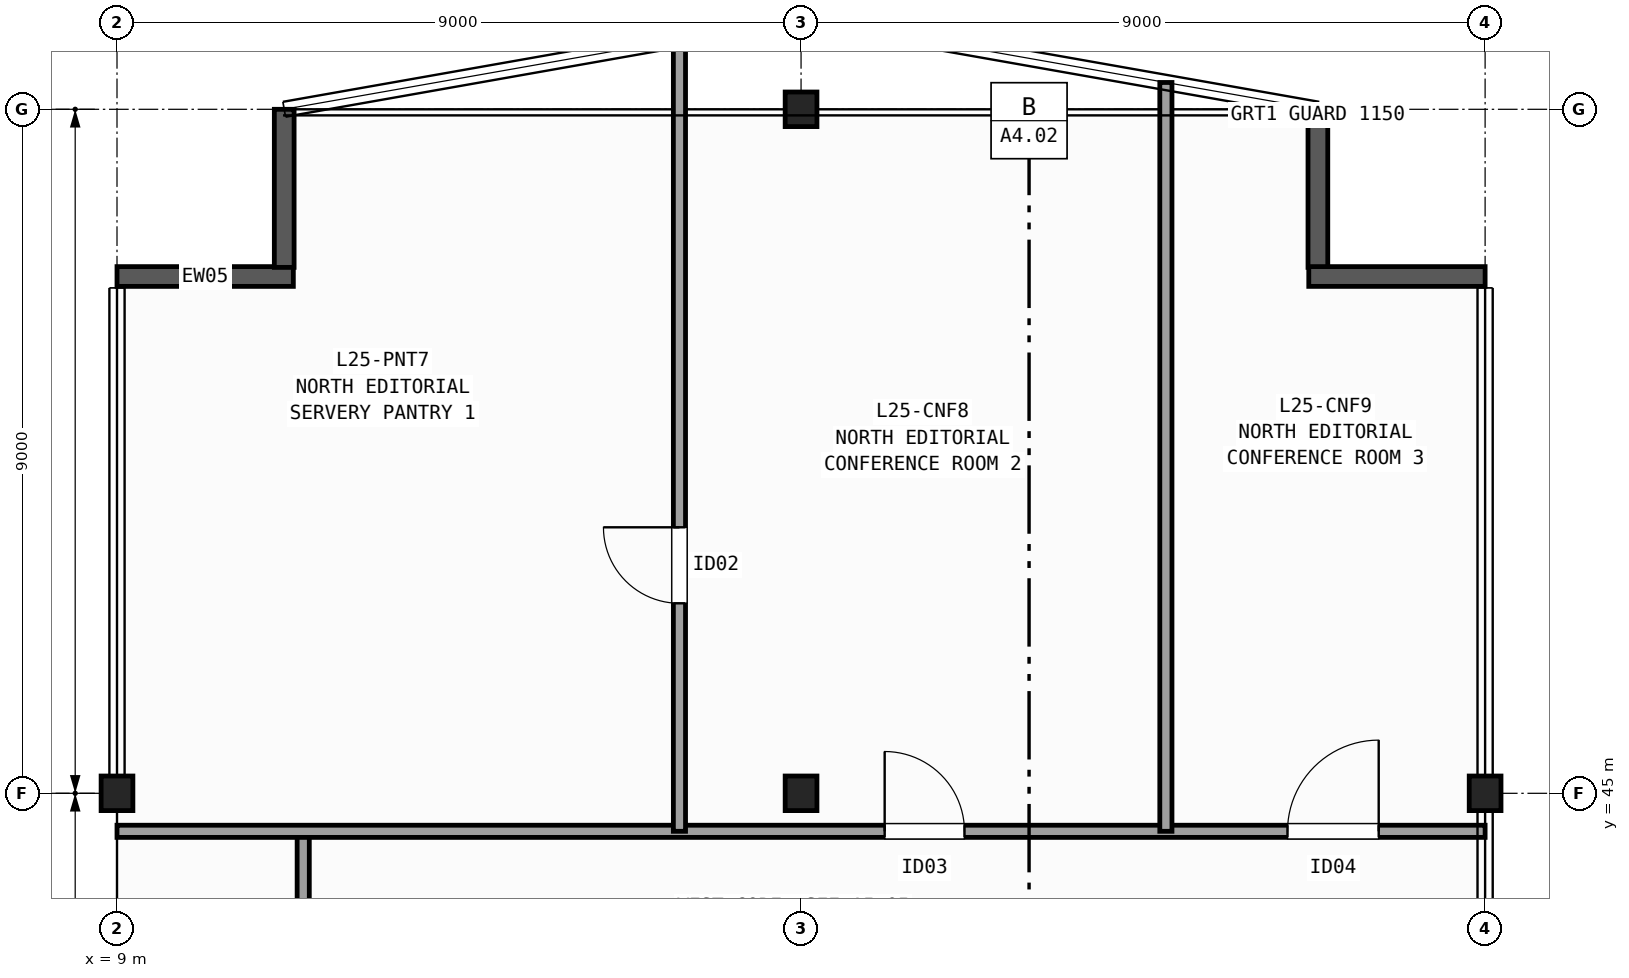
"""IFC4 building model, lengths in metres.
Left out: names, types, materials, properties, quantities, classifications, styles, units other than length and angle.
Written with IfcOpenShell. Run it as: python <this file> out.ifc"""

import sys

from ifc_helpers import new_model, si_unit, direction, frame, frame_2d, origin, origin_2d, place, context, subcontext, project, spatial, rectangle, i_section, extrude, element, fill, save


model = new_model("IFC4")
c1 = context("Model", 3, precision=1e-05, world=origin(), true_north=direction((0.0, 1.0)))
c2 = subcontext(c1, "Body", "Model", "MODEL_VIEW")
j1 = project(units=[si_unit("LENGTHUNIT", "METRE"), si_unit("PLANEANGLEUNIT", "RADIAN")], contexts=[c1])
p1 = place(None, origin())
s1 = spatial("IfcSite", under=j1, at=p1, CompositionType="ELEMENT")
p2 = place(p1, origin())
s2 = spatial("IfcBuilding", under=s1, at=p2, CompositionType="ELEMENT")
p3 = place(p2, frame((0.0, 0.0, 105.0)))
s3 = spatial("IfcBuildingStorey", under=s2, at=p3, CompositionType="ELEMENT", Elevation=105.0)
for number, where, z_axis, x_axis in (
    (1, (9.0, 45.0, 0.0), (0.0, 0.0, 1.0), (1.0, 0.0, 0.0)),
    (2, (18.0, 45.0, 0.0), (0.0, 0.0, 1.0), (1.0, 0.0, 0.0)),
    (3, (18.0, 54.0, 0.0), (0.0, 0.0, 1.0), (1.0, 0.0, 0.0)),
    (4, (27.0, 45.0, 0.0), (0.0, 0.0, 1.0), (1.0, 0.0, 0.0)),
):
    element("IfcColumn", number, at=place(p3, frame(where, z_axis=z_axis, x_axis=x_axis)), inside=s3, PredefinedType="COLUMN", context=c2, shape_type="SweptSolid", body=[
        extrude(i_section(OverallWidth=0.418, OverallDepth=0.455, WebThickness=0.042, FlangeThickness=0.068, FilletRadius=0.015, at=origin_2d()), origin(), (0.0, 0.0, 1.0), 5.0),
    ])
p4 = place(p3, frame((9.0, 51.8, 0.0), z_axis=(0.0, 0.0, 1.0), x_axis=(1.0, 0.0, 0.0)))
e5 = element("IfcWall", 5, at=p4, inside=s3, PredefinedType="SOLIDWALL", context=c2, shape_type="SweptSolid", body=[
    extrude(rectangle(XDim=2.32, YDim=0.26, at=frame_2d((1.16, 0.0))), origin(), (0.0, 0.0, 1.0), 4.72),
])
for number, where, z_axis, x_axis in (
    (6, (11.2, 51.92, 0.0), (0.0, 0.0, 1.0), (0.0, 1.0, 0.0)),
    (7, (24.8, 54.0, 0.0), (0.0, 0.0, 1.0), (0.0, -1.0, 0.0)),
):
    element("IfcWall", number, at=place(p3, frame(where, z_axis=z_axis, x_axis=x_axis)), inside=s3, PredefinedType="SOLIDWALL", context=c2, shape_type="SweptSolid", body=[
        extrude(rectangle(XDim=2.08, YDim=0.26, at=frame_2d((1.04, 0.0))), origin(), (0.0, 0.0, 1.0), 4.72),
    ])
p5 = place(p3, frame((24.68, 51.8, 0.0), z_axis=(0.0, 0.0, 1.0), x_axis=(1.0, 0.0, 0.0)))
e8 = element("IfcWall", 8, at=p5, inside=s3, PredefinedType="SOLIDWALL", context=c2, shape_type="SweptSolid", body=[
    extrude(rectangle(XDim=2.32, YDim=0.26, at=frame_2d((1.16, 0.0))), origin(), (0.0, 0.0, 1.0), 4.72),
])
p6 = place(p3, frame((11.45, 42.4, 0.0), z_axis=(0.0, 0.0, 1.0), x_axis=(0.0, 1.0, 0.0)))
e9 = element("IfcWall", 9, at=p6, inside=s3, PredefinedType="PARTITIONING", context=c2, shape_type="SweptSolid", body=[
    extrude(rectangle(XDim=2.1, YDim=0.16, at=frame_2d((1.05, 0.0))), origin(), (0.0, 0.0, 1.0), 4.72),
])
p7 = place(p3, frame((9.0, 44.5, 0.0), z_axis=(0.0, 0.0, 1.0), x_axis=(1.0, 0.0, 0.0)))
e10 = element("IfcWall", 10, at=p7, inside=s3, PredefinedType="PARTITIONING", context=c2, shape_type="SweptSolid", body=[
    extrude(rectangle(XDim=18.0, YDim=0.16, at=frame_2d((9.0, 0.0))), origin(), (0.0, 0.0, 1.0), 3.934),
])
p8 = place(p7, frame((10.1, 0.0, 0.0)))
e11 = element("IfcOpeningElement", 11, at=p8, cuts=e10, PredefinedType="OPENING", context=c2, shape_type="SweptSolid", body=[
    extrude(rectangle(XDim=1.05, YDim=2.15, at=frame_2d((0.525, 1.075))), frame((0.0, 0.09, 0.0), z_axis=(0.0, -1.0, 0.0), x_axis=(1.0, 0.0, 0.0)), (0.0, 0.0, 1.0), 0.18),
])
p9 = place(p7, frame((15.4, 0.0, 0.0)))
e12 = element("IfcOpeningElement", 12, at=p9, cuts=e10, PredefinedType="OPENING", context=c2, shape_type="SweptSolid", body=[
    extrude(rectangle(XDim=1.2, YDim=2.15, at=frame_2d((0.6, 1.075))), frame((0.0, 0.09, 0.0), z_axis=(0.0, -1.0, 0.0), x_axis=(1.0, 0.0, 0.0)), (0.0, 0.0, 1.0), 0.18),
])
p10 = place(p3, frame((16.4, 44.5, 0.0), z_axis=(0.0, 0.0, 1.0), x_axis=(0.0, 1.0, 0.0)))
e13 = element("IfcWall", 13, at=p10, inside=s3, PredefinedType="PARTITIONING", context=c2, shape_type="SweptSolid", body=[
    extrude(rectangle(XDim=10.418, YDim=0.16, at=frame_2d((5.209, 0.0))), origin(), (0.0, 0.0, 1.0), 4.089),
])
p11 = place(p10, frame((3.0, 0.0, 0.0)))
e14 = element("IfcOpeningElement", 14, at=p11, cuts=e13, PredefinedType="OPENING", context=c2, shape_type="SweptSolid", body=[
    extrude(rectangle(XDim=1.0, YDim=2.1, at=frame_2d((0.5, 1.05))), frame((0.0, 0.09, 0.0), z_axis=(0.0, -1.0, 0.0), x_axis=(1.0, 0.0, 0.0)), (0.0, 0.0, 1.0), 0.18),
])
p12 = place(p3, frame((22.8, 44.5, 0.0), z_axis=(0.0, 0.0, 1.0), x_axis=(0.0, 1.0, 0.0)))
e15 = element("IfcWall", 15, at=p12, inside=s3, PredefinedType="PARTITIONING", context=c2, shape_type="SweptSolid", body=[
    extrude(rectangle(XDim=9.853, YDim=0.16, at=frame_2d((4.927, 0.0))), origin(), (0.0, 0.0, 1.0), 4.089),
])
p13 = place(p11, origin())
e16 = element("IfcDoor", 16, at=p13, inside=s3, OperationType="SINGLE_SWING_RIGHT", PredefinedType="DOOR", context=c2, shape_type="SweptSolid", body=[
    extrude(rectangle(XDim=1.0, YDim=2.1, at=frame_2d((0.5, 1.05))), frame((0.0, 0.025, 0.0), z_axis=(0.0, -1.0, 0.0), x_axis=(1.0, 0.0, 0.0)), (0.0, 0.0, 1.0), 0.05),
])
fill(e14, e16)
p14 = place(p8, origin())
e17 = element("IfcDoor", 17, at=p14, inside=s3, OperationType="SINGLE_SWING_LEFT", PredefinedType="DOOR", context=c2, shape_type="SweptSolid", body=[
    extrude(rectangle(XDim=1.05, YDim=2.15, at=frame_2d((0.525, 1.075))), frame((0.0, 0.025, 0.0), z_axis=(0.0, -1.0, 0.0), x_axis=(1.0, 0.0, 0.0)), (0.0, 0.0, 1.0), 0.05),
])
fill(e11, e17)
p15 = place(p9, origin())
e18 = element("IfcDoor", 18, at=p15, inside=s3, OperationType="SINGLE_SWING_RIGHT", PredefinedType="DOOR", context=c2, shape_type="SweptSolid", body=[
    extrude(rectangle(XDim=1.2, YDim=2.15, at=frame_2d((0.6, 1.075))), frame((0.0, 0.025, 0.0), z_axis=(0.0, -1.0, 0.0), x_axis=(1.0, 0.0, 0.0)), (0.0, 0.0, 1.0), 0.05),
])
fill(e12, e18)
save(model, sys.argv[1])
